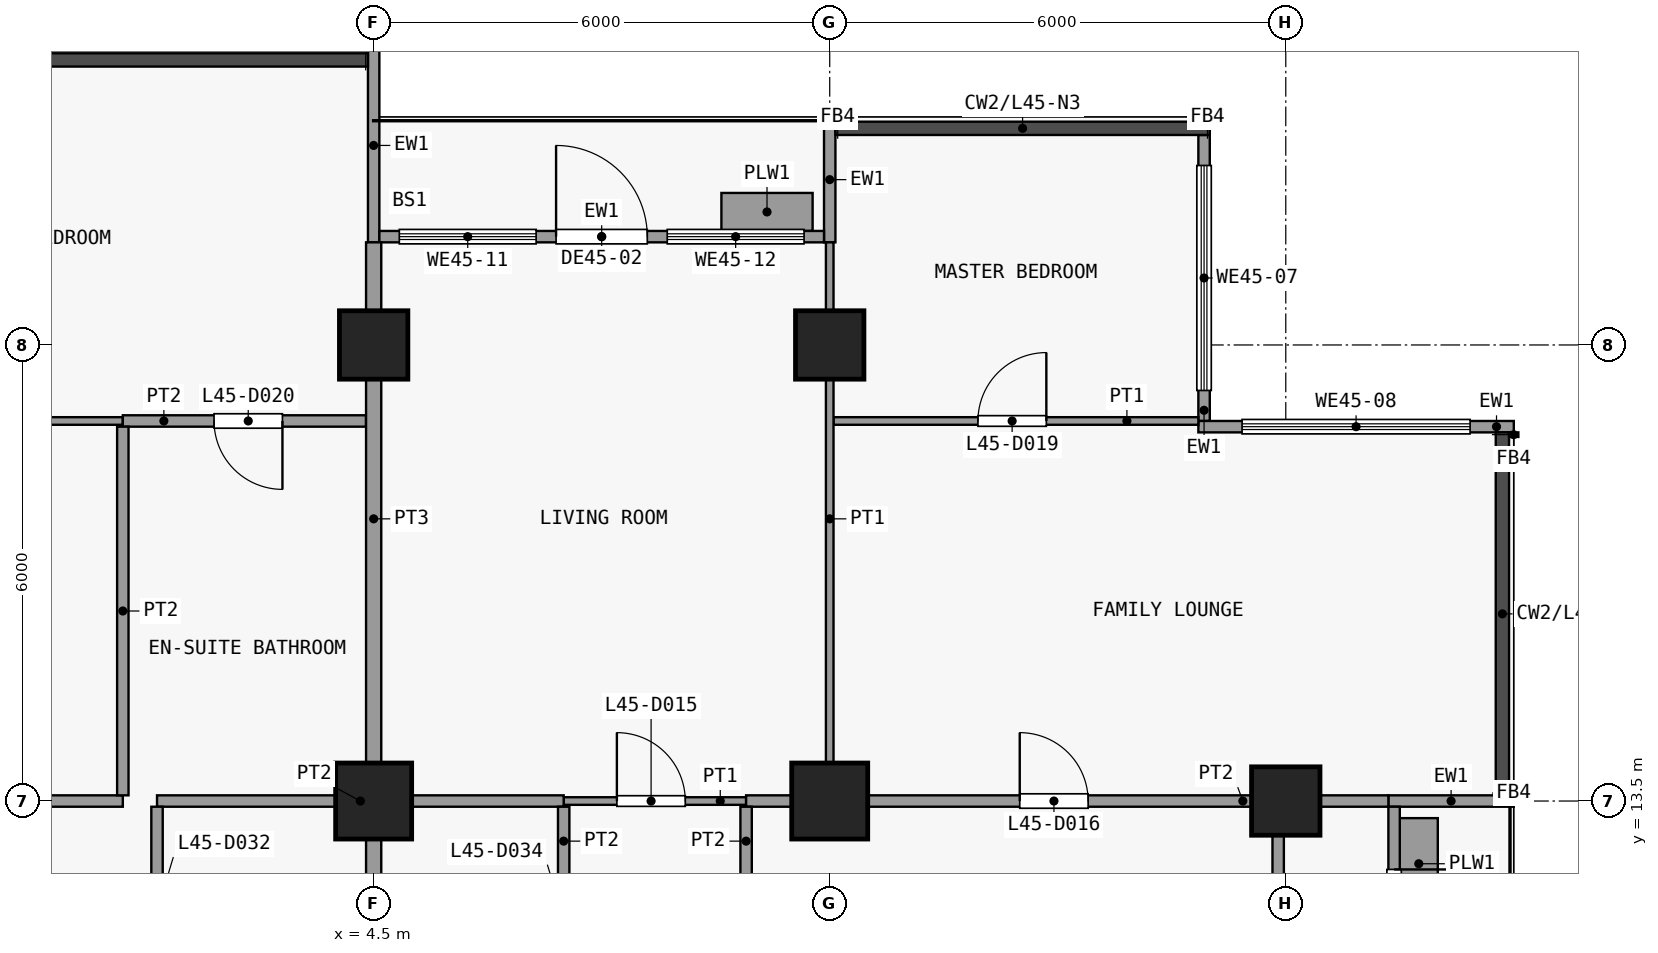
"""IFC4 building model, lengths in metres.
Left out: names, types, materials, properties, quantities, classifications, styles, units other than length and angle.
Written with IfcOpenShell. Run it as: python <this file> out.ifc"""

import sys

from ifc_helpers import new_model, si_unit, direction, frame, frame_2d, origin, origin_2d, place, context, subcontext, project, spatial, rectangle, extrude, element, fill, save


model = new_model("IFC4")
c1 = context("Model", 3, precision=1e-05, world=origin(), true_north=direction((0.0, 1.0)))
c2 = subcontext(c1, "Body", "Model", "MODEL_VIEW")
j1 = project(units=[si_unit("LENGTHUNIT", "METRE"), si_unit("PLANEANGLEUNIT", "RADIAN")], contexts=[c1])
p1 = place(None, origin())
s1 = spatial("IfcSite", under=j1, at=p1, CompositionType="ELEMENT")
p2 = place(p1, origin())
s2 = spatial("IfcBuilding", under=s1, at=p2, CompositionType="ELEMENT")
p3 = place(p2, frame((0.0, 0.0, 181.7)))
s3 = spatial("IfcBuildingStorey", under=s2, at=p3, CompositionType="ELEMENT", Elevation=181.7)
p4 = place(p3, frame((4.5, 13.5, 0.0), z_axis=(0.0, 0.0, 1.0), x_axis=(1.0, 0.0, 0.0)))
e1 = element("IfcColumn", 1, at=p4, inside=s3, PredefinedType="COLUMN", context=c2, shape_type="SweptSolid", body=[
    extrude(rectangle(XDim=1.0, YDim=1.0, at=origin_2d()), origin(), (0.0, 0.0, 1.0), 3.6),
])
p5 = place(p3, frame((4.5, 19.5, 0.0), z_axis=(0.0, 0.0, 1.0), x_axis=(1.0, 0.0, 0.0)))
e2 = element("IfcColumn", 2, at=p5, inside=s3, PredefinedType="COLUMN", context=c2, shape_type="SweptSolid", body=[
    extrude(rectangle(XDim=0.9, YDim=0.9, at=origin_2d()), origin(), (0.0, 0.0, 1.0), 3.6),
])
p6 = place(p3, frame((10.5, 13.5, 0.0), z_axis=(0.0, 0.0, 1.0), x_axis=(1.0, 0.0, 0.0)))
e3 = element("IfcColumn", 3, at=p6, inside=s3, PredefinedType="COLUMN", context=c2, shape_type="SweptSolid", body=[
    extrude(rectangle(XDim=1.0, YDim=1.0, at=origin_2d()), origin(), (0.0, 0.0, 1.0), 3.6),
])
for number, where, z_axis, x_axis in (
    (4, (10.5, 19.5, 0.0), (0.0, 0.0, 1.0), (1.0, 0.0, 0.0)),
    (5, (16.5, 13.5, 0.0), (0.0, 0.0, 1.0), (1.0, 0.0, 0.0)),
):
    element("IfcColumn", number, at=place(p3, frame(where, z_axis=z_axis, x_axis=x_axis)), inside=s3, PredefinedType="COLUMN", context=c2, shape_type="SweptSolid", body=[
        extrude(rectangle(XDim=0.9, YDim=0.9, at=origin_2d()), origin(), (0.0, 0.0, 1.0), 3.6),
    ])
p7 = place(p3, frame((15.425, 22.262, 0.0), z_axis=(0.0, 0.0, 1.0), x_axis=(0.0, -1.0, 0.0)))
e6 = element("IfcWall", 6, at=p7, inside=s3, PredefinedType="SOLIDWALL", context=c2, shape_type="SweptSolid", body=[
    extrude(rectangle(XDim=3.762, YDim=0.15, at=frame_2d((1.881, 0.0))), origin(), (0.0, 0.0, 1.0), 3.3),
])
p8 = place(p7, frame((0.401, 0.0, 0.9)))
e7 = element("IfcOpeningElement", 7, at=p8, cuts=e6, PredefinedType="OPENING", context=c2, shape_type="SweptSolid", body=[
    extrude(rectangle(XDim=2.96, YDim=2.4, at=frame_2d((1.48, 1.2))), frame((0.0, 0.085, 0.0), z_axis=(0.0, -1.0, 0.0), x_axis=(1.0, 0.0, 0.0)), (0.0, 0.0, 1.0), 0.17),
])
p9 = place(p3, frame((15.35, 18.425, 0.0), z_axis=(0.0, 0.0, 1.0), x_axis=(1.0, 0.0, 0.0)))
e8 = element("IfcWall", 8, at=p9, inside=s3, PredefinedType="SOLIDWALL", context=c2, shape_type="SweptSolid", body=[
    extrude(rectangle(XDim=4.15, YDim=0.15, at=frame_2d((2.075, 0.0))), origin(), (0.0, 0.0, 1.0), 3.3),
])
p10 = place(p9, frame((0.575, 0.0, 0.9)))
e9 = element("IfcOpeningElement", 9, at=p10, cuts=e8, PredefinedType="OPENING", context=c2, shape_type="SweptSolid", body=[
    extrude(rectangle(XDim=3.0, YDim=2.4, at=frame_2d((1.5, 1.2))), frame((0.0, 0.085, 0.0), z_axis=(0.0, -1.0, 0.0), x_axis=(1.0, 0.0, 0.0)), (0.0, 0.0, 1.0), 0.17),
])
p11 = place(p3, frame((4.5, 20.85, 0.0), z_axis=(0.0, 0.0, 1.0), x_axis=(0.0, 1.0, 0.0)))
e10 = element("IfcWall", 10, at=p11, inside=s3, PredefinedType="SOLIDWALL", context=c2, shape_type="SweptSolid", body=[
    extrude(rectangle(XDim=2.55, YDim=0.15, at=frame_2d((1.275, 0.0))), origin(), (0.0, 0.0, 1.0), 3.3),
])
p12 = place(p3, frame((10.5, 20.85, 0.0), z_axis=(0.0, 0.0, 1.0), x_axis=(0.0, 1.0, 0.0)))
e11 = element("IfcWall", 11, at=p12, inside=s3, PredefinedType="SOLIDWALL", context=c2, shape_type="SweptSolid", body=[
    extrude(rectangle(XDim=1.65, YDim=0.15, at=frame_2d((0.825, 0.0))), origin(), (0.0, 0.0, 1.0), 3.3),
])
p13 = place(p3, frame((4.575, 20.925, 0.0), z_axis=(0.0, 0.0, 1.0), x_axis=(1.0, 0.0, 0.0)))
e12 = element("IfcWall", 12, at=p13, inside=s3, PredefinedType="SOLIDWALL", context=c2, shape_type="SweptSolid", body=[
    extrude(rectangle(XDim=5.85, YDim=0.15, at=frame_2d((2.925, 0.0))), origin(), (0.0, 0.0, 1.0), 3.3),
])
p14 = place(p13, frame((2.325, 0.0, 0.0)))
e13 = element("IfcOpeningElement", 13, at=p14, cuts=e12, PredefinedType="OPENING", context=c2, shape_type="SweptSolid", body=[
    extrude(rectangle(XDim=1.2, YDim=2.4, at=frame_2d((0.6, 1.2))), frame((0.0, 0.085, 0.0), z_axis=(0.0, -1.0, 0.0), x_axis=(1.0, 0.0, 0.0)), (0.0, 0.0, 1.0), 0.17),
])
p15 = place(p13, frame((0.262, 0.0, 0.9)))
e14 = element("IfcOpeningElement", 14, at=p15, cuts=e12, PredefinedType="OPENING", context=c2, shape_type="SweptSolid", body=[
    extrude(rectangle(XDim=1.8, YDim=2.1, at=frame_2d((0.9, 1.05))), frame((0.0, 0.085, 0.0), z_axis=(0.0, -1.0, 0.0), x_axis=(1.0, 0.0, 0.0)), (0.0, 0.0, 1.0), 0.17),
])
p16 = place(p13, frame((3.788, 0.0, 0.9)))
e15 = element("IfcOpeningElement", 15, at=p16, cuts=e12, PredefinedType="OPENING", context=c2, shape_type="SweptSolid", body=[
    extrude(rectangle(XDim=1.8, YDim=2.1, at=frame_2d((0.9, 1.05))), frame((0.0, 0.085, 0.0), z_axis=(0.0, -1.0, 0.0), x_axis=(1.0, 0.0, 0.0)), (0.0, 0.0, 1.0), 0.17),
])
p17 = place(p3, frame((9.075, 21.25, 0.0), z_axis=(0.0, 0.0, 1.0), x_axis=(1.0, 0.0, 0.0)))
e16 = element("IfcWall", 16, at=p17, inside=s3, PredefinedType="USERDEFINED", context=c2, shape_type="SweptSolid", body=[
    extrude(rectangle(XDim=1.2, YDim=0.5, at=frame_2d((0.6, 0.0))), origin(), (0.0, 0.0, 1.0), 0.9),
])
p18 = place(p3, frame((17.85, 13.5, 0.0), z_axis=(0.0, 0.0, 1.0), x_axis=(1.0, 0.0, 0.0)))
e17 = element("IfcWall", 17, at=p18, inside=s3, PredefinedType="SOLIDWALL", context=c2, shape_type="SweptSolid", body=[
    extrude(rectangle(XDim=1.65, YDim=0.15, at=frame_2d((0.825, 0.0))), origin(), (0.0, 0.0, 1.0), 3.3),
])
p19 = place(p3, frame((17.925, 13.425, 0.0), z_axis=(0.0, 0.0, 1.0), x_axis=(0.0, -1.0, 0.0)))
e18 = element("IfcWall", 18, at=p19, inside=s3, PredefinedType="SOLIDWALL", context=c2, shape_type="SweptSolid", body=[
    extrude(rectangle(XDim=5.85, YDim=0.15, at=frame_2d((2.925, 0.0))), origin(), (0.0, 0.0, 1.0), 3.3),
])
p20 = place(p19, frame((0.825, 0.0, 0.0)))
e19 = element("IfcOpeningElement", 19, at=p20, cuts=e18, PredefinedType="OPENING", context=c2, shape_type="SweptSolid", body=[
    extrude(rectangle(XDim=1.2, YDim=2.4, at=frame_2d((0.6, 1.2))), frame((0.0, 0.085, 0.0), z_axis=(0.0, -1.0, 0.0), x_axis=(1.0, 0.0, 0.0)), (0.0, 0.0, 1.0), 0.17),
])
p21 = place(p19, frame((3.038, 0.0, 0.9)))
e20 = element("IfcOpeningElement", 20, at=p21, cuts=e18, PredefinedType="OPENING", context=c2, shape_type="SweptSolid", body=[
    extrude(rectangle(XDim=1.8, YDim=2.1, at=frame_2d((0.9, 1.05))), frame((0.0, 0.085, 0.0), z_axis=(0.0, -1.0, 0.0), x_axis=(1.0, 0.0, 0.0)), (0.0, 0.0, 1.0), 0.17),
])
p22 = place(p3, frame((18.25, 12.075, 0.0), z_axis=(0.0, 0.0, 1.0), x_axis=(0.0, 1.0, 0.0)))
e21 = element("IfcWall", 21, at=p22, inside=s3, PredefinedType="USERDEFINED", context=c2, shape_type="SweptSolid", body=[
    extrude(rectangle(XDim=1.2, YDim=0.5, at=frame_2d((0.6, 0.0))), origin(), (0.0, 0.0, 1.0), 0.9),
])
p23 = place(p3, frame((7.0, 13.5, 0.0), z_axis=(0.0, 0.0, 1.0), x_axis=(1.0, 0.0, 0.0)))
e22 = element("IfcWall", 22, at=p23, inside=s3, PredefinedType="PARTITIONING", context=c2, shape_type="SweptSolid", body=[
    extrude(rectangle(XDim=2.4, YDim=0.1, at=frame_2d((1.2, 0.0))), origin(), (0.0, 0.0, 1.0), 3.3),
])
p24 = place(p23, frame((0.7, 0.0, 0.0)))
e23 = element("IfcOpeningElement", 23, at=p24, cuts=e22, PredefinedType="OPENING", context=c2, shape_type="SweptSolid", body=[
    extrude(rectangle(XDim=0.9, YDim=2.1, at=frame_2d((0.45, 1.05))), frame((0.0, 0.06, 0.0), z_axis=(0.0, -1.0, 0.0), x_axis=(1.0, 0.0, 0.0)), (0.0, 0.0, 1.0), 0.12),
])
p25 = place(p3, frame((-4.5, 13.5, 0.0), z_axis=(0.0, 0.0, 1.0), x_axis=(1.0, 0.0, 0.0)))
e24 = element("IfcWall", 24, at=p25, inside=s3, PredefinedType="PARTITIONING", context=c2, shape_type="SweptSolid", body=[
    extrude(rectangle(XDim=5.7, YDim=0.15, at=frame_2d((2.85, 0.0))), origin(), (0.0, 0.0, 1.0), 3.3),
])
p26 = place(p3, frame((1.65, 13.5, 0.0), z_axis=(0.0, 0.0, 1.0), x_axis=(1.0, 0.0, 0.0)))
e25 = element("IfcWall", 25, at=p26, inside=s3, PredefinedType="PARTITIONING", context=c2, shape_type="SweptSolid", body=[
    extrude(rectangle(XDim=5.35, YDim=0.15, at=frame_2d((2.675, 0.0))), origin(), (0.0, 0.0, 1.0), 3.3),
])
p27 = place(p3, frame((9.4, 13.5, 0.0), z_axis=(0.0, 0.0, 1.0), x_axis=(1.0, 0.0, 0.0)))
e26 = element("IfcWall", 26, at=p27, inside=s3, PredefinedType="PARTITIONING", context=c2, shape_type="SweptSolid", body=[
    extrude(rectangle(XDim=8.45, YDim=0.15, at=frame_2d((4.225, 0.0))), origin(), (0.0, 0.0, 1.0), 3.3),
])
p28 = place(p27, frame((3.6, 0.0, 0.0)))
e27 = element("IfcOpeningElement", 27, at=p28, cuts=e26, PredefinedType="OPENING", context=c2, shape_type="SweptSolid", body=[
    extrude(rectangle(XDim=0.9, YDim=2.1, at=frame_2d((0.45, 1.05))), frame((0.0, 0.085, 0.0), z_axis=(0.0, -1.0, 0.0), x_axis=(1.0, 0.0, 0.0)), (0.0, 0.0, 1.0), 0.17),
])
p29 = place(p3, frame((-4.45, 18.5, 0.0), z_axis=(0.0, 0.0, 1.0), x_axis=(1.0, 0.0, 0.0)))
e28 = element("IfcWall", 28, at=p29, inside=s3, PredefinedType="PARTITIONING", context=c2, shape_type="SweptSolid", body=[
    extrude(rectangle(XDim=5.65, YDim=0.1, at=frame_2d((2.825, 0.0))), origin(), (0.0, 0.0, 1.0), 3.3),
])
p30 = place(p29, frame((2.4, 0.0, 0.0)))
e29 = element("IfcOpeningElement", 29, at=p30, cuts=e28, PredefinedType="OPENING", context=c2, shape_type="SweptSolid", body=[
    extrude(rectangle(XDim=0.9, YDim=2.1, at=frame_2d((0.45, 1.05))), frame((0.0, 0.06, 0.0), z_axis=(0.0, -1.0, 0.0), x_axis=(1.0, 0.0, 0.0)), (0.0, 0.0, 1.0), 0.12),
])
p31 = place(p3, frame((10.55, 18.5, 0.0), z_axis=(0.0, 0.0, 1.0), x_axis=(1.0, 0.0, 0.0)))
e30 = element("IfcWall", 30, at=p31, inside=s3, PredefinedType="PARTITIONING", context=c2, shape_type="SweptSolid", body=[
    extrude(rectangle(XDim=4.8, YDim=0.1, at=frame_2d((2.4, 0.0))), origin(), (0.0, 0.0, 1.0), 3.3),
])
p32 = place(p31, frame((1.9, 0.0, 0.0)))
e31 = element("IfcOpeningElement", 31, at=p32, cuts=e30, PredefinedType="OPENING", context=c2, shape_type="SweptSolid", body=[
    extrude(rectangle(XDim=0.9, YDim=2.1, at=frame_2d((0.45, 1.05))), frame((0.0, 0.06, 0.0), z_axis=(0.0, -1.0, 0.0), x_axis=(1.0, 0.0, 0.0)), (0.0, 0.0, 1.0), 0.12),
])
p33 = place(p3, frame((1.2, 18.5, 0.0), z_axis=(0.0, 0.0, 1.0), x_axis=(1.0, 0.0, 0.0)))
e32 = element("IfcWall", 32, at=p33, inside=s3, PredefinedType="PARTITIONING", context=c2, shape_type="SweptSolid", body=[
    extrude(rectangle(XDim=3.2, YDim=0.15, at=frame_2d((1.6, 0.0))), origin(), (0.0, 0.0, 1.0), 3.3),
])
p34 = place(p33, frame((1.2, 0.0, 0.0)))
e33 = element("IfcOpeningElement", 33, at=p34, cuts=e32, PredefinedType="OPENING", context=c2, shape_type="SweptSolid", body=[
    extrude(rectangle(XDim=0.9, YDim=2.1, at=frame_2d((0.45, 1.05))), frame((0.0, 0.085, 0.0), z_axis=(0.0, -1.0, 0.0), x_axis=(1.0, 0.0, 0.0)), (0.0, 0.0, 1.0), 0.17),
])
p35 = place(p3, frame((1.2, 13.575, 0.0), z_axis=(0.0, 0.0, 1.0), x_axis=(0.0, 1.0, 0.0)))
e34 = element("IfcWall", 34, at=p35, inside=s3, PredefinedType="PARTITIONING", context=c2, shape_type="SweptSolid", body=[
    extrude(rectangle(XDim=4.85, YDim=0.15, at=frame_2d((2.425, 0.0))), origin(), (0.0, 0.0, 1.0), 3.3),
])
p36 = place(p3, frame((1.65, 10.6, 0.0), z_axis=(0.0, 0.0, 1.0), x_axis=(0.0, 1.0, 0.0)))
e35 = element("IfcWall", 35, at=p36, inside=s3, PredefinedType="PARTITIONING", context=c2, shape_type="SweptSolid", body=[
    extrude(rectangle(XDim=2.825, YDim=0.15, at=frame_2d((1.413, 0.0))), origin(), (0.0, 0.0, 1.0), 3.3),
])
p37 = place(p36, frame((1.0, 0.0, 0.0)))
e36 = element("IfcOpeningElement", 36, at=p37, cuts=e35, PredefinedType="OPENING", context=c2, shape_type="SweptSolid", body=[
    extrude(rectangle(XDim=0.9, YDim=2.1, at=frame_2d((0.45, 1.05))), frame((0.0, 0.085, 0.0), z_axis=(0.0, -1.0, 0.0), x_axis=(1.0, 0.0, 0.0)), (0.0, 0.0, 1.0), 0.17),
])
p38 = place(p3, frame((4.5, 10.6, 0.0), z_axis=(0.0, 0.0, 1.0), x_axis=(0.0, 1.0, 0.0)))
e37 = element("IfcWall", 37, at=p38, inside=s3, PredefinedType="PARTITIONING", context=c2, shape_type="SweptSolid", body=[
    extrude(rectangle(XDim=2.825, YDim=0.2, at=frame_2d((1.413, 0.0))), origin(), (0.0, 0.0, 1.0), 3.3),
])
p39 = place(p3, frame((4.5, 13.575, 0.0), z_axis=(0.0, 0.0, 1.0), x_axis=(0.0, 1.0, 0.0)))
e38 = element("IfcWall", 38, at=p39, inside=s3, PredefinedType="PARTITIONING", context=c2, shape_type="SweptSolid", body=[
    extrude(rectangle(XDim=7.275, YDim=0.2, at=frame_2d((3.638, 0.0))), origin(), (0.0, 0.0, 1.0), 3.3),
])
p40 = place(p3, frame((7.0, 10.6, 0.0), z_axis=(0.0, 0.0, 1.0), x_axis=(0.0, 1.0, 0.0)))
e39 = element("IfcWall", 39, at=p40, inside=s3, PredefinedType="PARTITIONING", context=c2, shape_type="SweptSolid", body=[
    extrude(rectangle(XDim=2.825, YDim=0.15, at=frame_2d((1.413, 0.0))), origin(), (0.0, 0.0, 1.0), 3.3),
])
p41 = place(p40, frame((0.9, 0.0, 0.0)))
e40 = element("IfcOpeningElement", 40, at=p41, cuts=e39, PredefinedType="OPENING", context=c2, shape_type="SweptSolid", body=[
    extrude(rectangle(XDim=0.9, YDim=2.1, at=frame_2d((0.45, 1.05))), frame((0.0, 0.085, 0.0), z_axis=(0.0, -1.0, 0.0), x_axis=(1.0, 0.0, 0.0)), (0.0, 0.0, 1.0), 0.17),
])
p42 = place(p3, frame((9.4, 10.6, 0.0), z_axis=(0.0, 0.0, 1.0), x_axis=(0.0, 1.0, 0.0)))
e41 = element("IfcWall", 41, at=p42, inside=s3, PredefinedType="PARTITIONING", context=c2, shape_type="SweptSolid", body=[
    extrude(rectangle(XDim=2.825, YDim=0.15, at=frame_2d((1.413, 0.0))), origin(), (0.0, 0.0, 1.0), 3.3),
])
p43 = place(p42, frame((0.9, 0.0, 0.0)))
e42 = element("IfcOpeningElement", 42, at=p43, cuts=e41, PredefinedType="OPENING", context=c2, shape_type="SweptSolid", body=[
    extrude(rectangle(XDim=0.9, YDim=2.1, at=frame_2d((0.45, 1.05))), frame((0.0, 0.085, 0.0), z_axis=(0.0, -1.0, 0.0), x_axis=(1.0, 0.0, 0.0)), (0.0, 0.0, 1.0), 0.17),
])
p44 = place(p3, frame((10.5, 13.575, 0.0), z_axis=(0.0, 0.0, 1.0), x_axis=(0.0, 1.0, 0.0)))
e43 = element("IfcWall", 43, at=p44, inside=s3, PredefinedType="PARTITIONING", context=c2, shape_type="SweptSolid", body=[
    extrude(rectangle(XDim=7.275, YDim=0.1, at=frame_2d((3.638, 0.0))), origin(), (0.0, 0.0, 1.0), 3.3),
])
p45 = place(p3, frame((16.4, 10.6, 0.0), z_axis=(0.0, 0.0, 1.0), x_axis=(0.0, 1.0, 0.0)))
e44 = element("IfcWall", 44, at=p45, inside=s3, PredefinedType="PARTITIONING", context=c2, shape_type="SweptSolid", body=[
    extrude(rectangle(XDim=2.825, YDim=0.15, at=frame_2d((1.413, 0.0))), origin(), (0.0, 0.0, 1.0), 3.3),
])
p46 = place(p45, frame((1.0, 0.0, 0.0)))
e45 = element("IfcOpeningElement", 45, at=p46, cuts=e44, PredefinedType="OPENING", context=c2, shape_type="SweptSolid", body=[
    extrude(rectangle(XDim=0.9, YDim=2.1, at=frame_2d((0.45, 1.05))), frame((0.0, 0.085, 0.0), z_axis=(0.0, -1.0, 0.0), x_axis=(1.0, 0.0, 0.0)), (0.0, 0.0, 1.0), 0.17),
])
p47 = place(p8, origin())
e46 = element("IfcWindow", 46, at=p47, inside=s3, PartitioningType="SINGLE_PANEL", PredefinedType="WINDOW", context=c2, shape_type="SweptSolid", body=[
    extrude(rectangle(XDim=2.96, YDim=2.4, at=frame_2d((1.48, 1.2))), frame((0.0, 0.03, 0.0), z_axis=(0.0, -1.0, 0.0), x_axis=(1.0, 0.0, 0.0)), (0.0, 0.0, 1.0), 0.06),
])
fill(e7, e46)
p48 = place(p10, origin())
e47 = element("IfcWindow", 47, at=p48, inside=s3, PartitioningType="SINGLE_PANEL", PredefinedType="WINDOW", context=c2, shape_type="SweptSolid", body=[
    extrude(rectangle(XDim=3.0, YDim=2.4, at=frame_2d((1.5, 1.2))), frame((0.0, 0.03, 0.0), z_axis=(0.0, -1.0, 0.0), x_axis=(1.0, 0.0, 0.0)), (0.0, 0.0, 1.0), 0.06),
])
fill(e9, e47)
p49 = place(p14, origin())
e48 = element("IfcDoor", 48, at=p49, inside=s3, OperationType="SINGLE_SWING_LEFT", PredefinedType="DOOR", context=c2, shape_type="SweptSolid", body=[
    extrude(rectangle(XDim=1.2, YDim=2.4, at=frame_2d((0.6, 1.2))), frame((0.0, 0.025, 0.0), z_axis=(0.0, -1.0, 0.0), x_axis=(1.0, 0.0, 0.0)), (0.0, 0.0, 1.0), 0.05),
])
fill(e13, e48)
p50 = place(p15, origin())
e49 = element("IfcWindow", 49, at=p50, inside=s3, PartitioningType="SINGLE_PANEL", PredefinedType="WINDOW", context=c2, shape_type="SweptSolid", body=[
    extrude(rectangle(XDim=1.8, YDim=2.1, at=frame_2d((0.9, 1.05))), frame((0.0, 0.03, 0.0), z_axis=(0.0, -1.0, 0.0), x_axis=(1.0, 0.0, 0.0)), (0.0, 0.0, 1.0), 0.06),
])
fill(e14, e49)
p51 = place(p16, origin())
e50 = element("IfcWindow", 50, at=p51, inside=s3, PartitioningType="SINGLE_PANEL", PredefinedType="WINDOW", context=c2, shape_type="SweptSolid", body=[
    extrude(rectangle(XDim=1.8, YDim=2.1, at=frame_2d((0.9, 1.05))), frame((0.0, 0.03, 0.0), z_axis=(0.0, -1.0, 0.0), x_axis=(1.0, 0.0, 0.0)), (0.0, 0.0, 1.0), 0.06),
])
fill(e15, e50)
p52 = place(p20, origin())
e51 = element("IfcDoor", 51, at=p52, inside=s3, OperationType="SINGLE_SWING_LEFT", PredefinedType="DOOR", context=c2, shape_type="SweptSolid", body=[
    extrude(rectangle(XDim=1.2, YDim=2.4, at=frame_2d((0.6, 1.2))), frame((0.0, 0.025, 0.0), z_axis=(0.0, -1.0, 0.0), x_axis=(1.0, 0.0, 0.0)), (0.0, 0.0, 1.0), 0.05),
])
fill(e19, e51)
p53 = place(p24, origin())
e52 = element("IfcDoor", 52, at=p53, inside=s3, OperationType="SINGLE_SWING_RIGHT", PredefinedType="DOOR", context=c2, shape_type="SweptSolid", body=[
    extrude(rectangle(XDim=0.9, YDim=2.1, at=frame_2d((0.45, 1.05))), frame((0.0, 0.025, 0.0), z_axis=(0.0, -1.0, 0.0), x_axis=(1.0, 0.0, 0.0)), (0.0, 0.0, 1.0), 0.05),
])
fill(e23, e52)
p54 = place(p28, origin())
e53 = element("IfcDoor", 53, at=p54, inside=s3, OperationType="SINGLE_SWING_RIGHT", PredefinedType="DOOR", context=c2, shape_type="SweptSolid", body=[
    extrude(rectangle(XDim=0.9, YDim=2.1, at=frame_2d((0.45, 1.05))), frame((0.0, 0.025, 0.0), z_axis=(0.0, -1.0, 0.0), x_axis=(1.0, 0.0, 0.0)), (0.0, 0.0, 1.0), 0.05),
])
fill(e27, e53)
p55 = place(p32, origin())
e54 = element("IfcDoor", 54, at=p55, inside=s3, OperationType="SINGLE_SWING_LEFT", PredefinedType="DOOR", context=c2, shape_type="SweptSolid", body=[
    extrude(rectangle(XDim=0.9, YDim=2.1, at=frame_2d((0.45, 1.05))), frame((0.0, 0.025, 0.0), z_axis=(0.0, -1.0, 0.0), x_axis=(1.0, 0.0, 0.0)), (0.0, 0.0, 1.0), 0.05),
])
fill(e31, e54)
p56 = place(p34, origin())
e55 = element("IfcDoor", 55, at=p56, inside=s3, OperationType="SINGLE_SWING_RIGHT", PredefinedType="DOOR", context=c2, shape_type="SweptSolid", body=[
    extrude(rectangle(XDim=0.9, YDim=2.1, at=frame_2d((0.45, 1.05))), frame((0.0, 0.025, 0.0), z_axis=(0.0, -1.0, 0.0), x_axis=(1.0, 0.0, 0.0)), (0.0, 0.0, 1.0), 0.05),
])
fill(e33, e55)
save(model, sys.argv[1])
